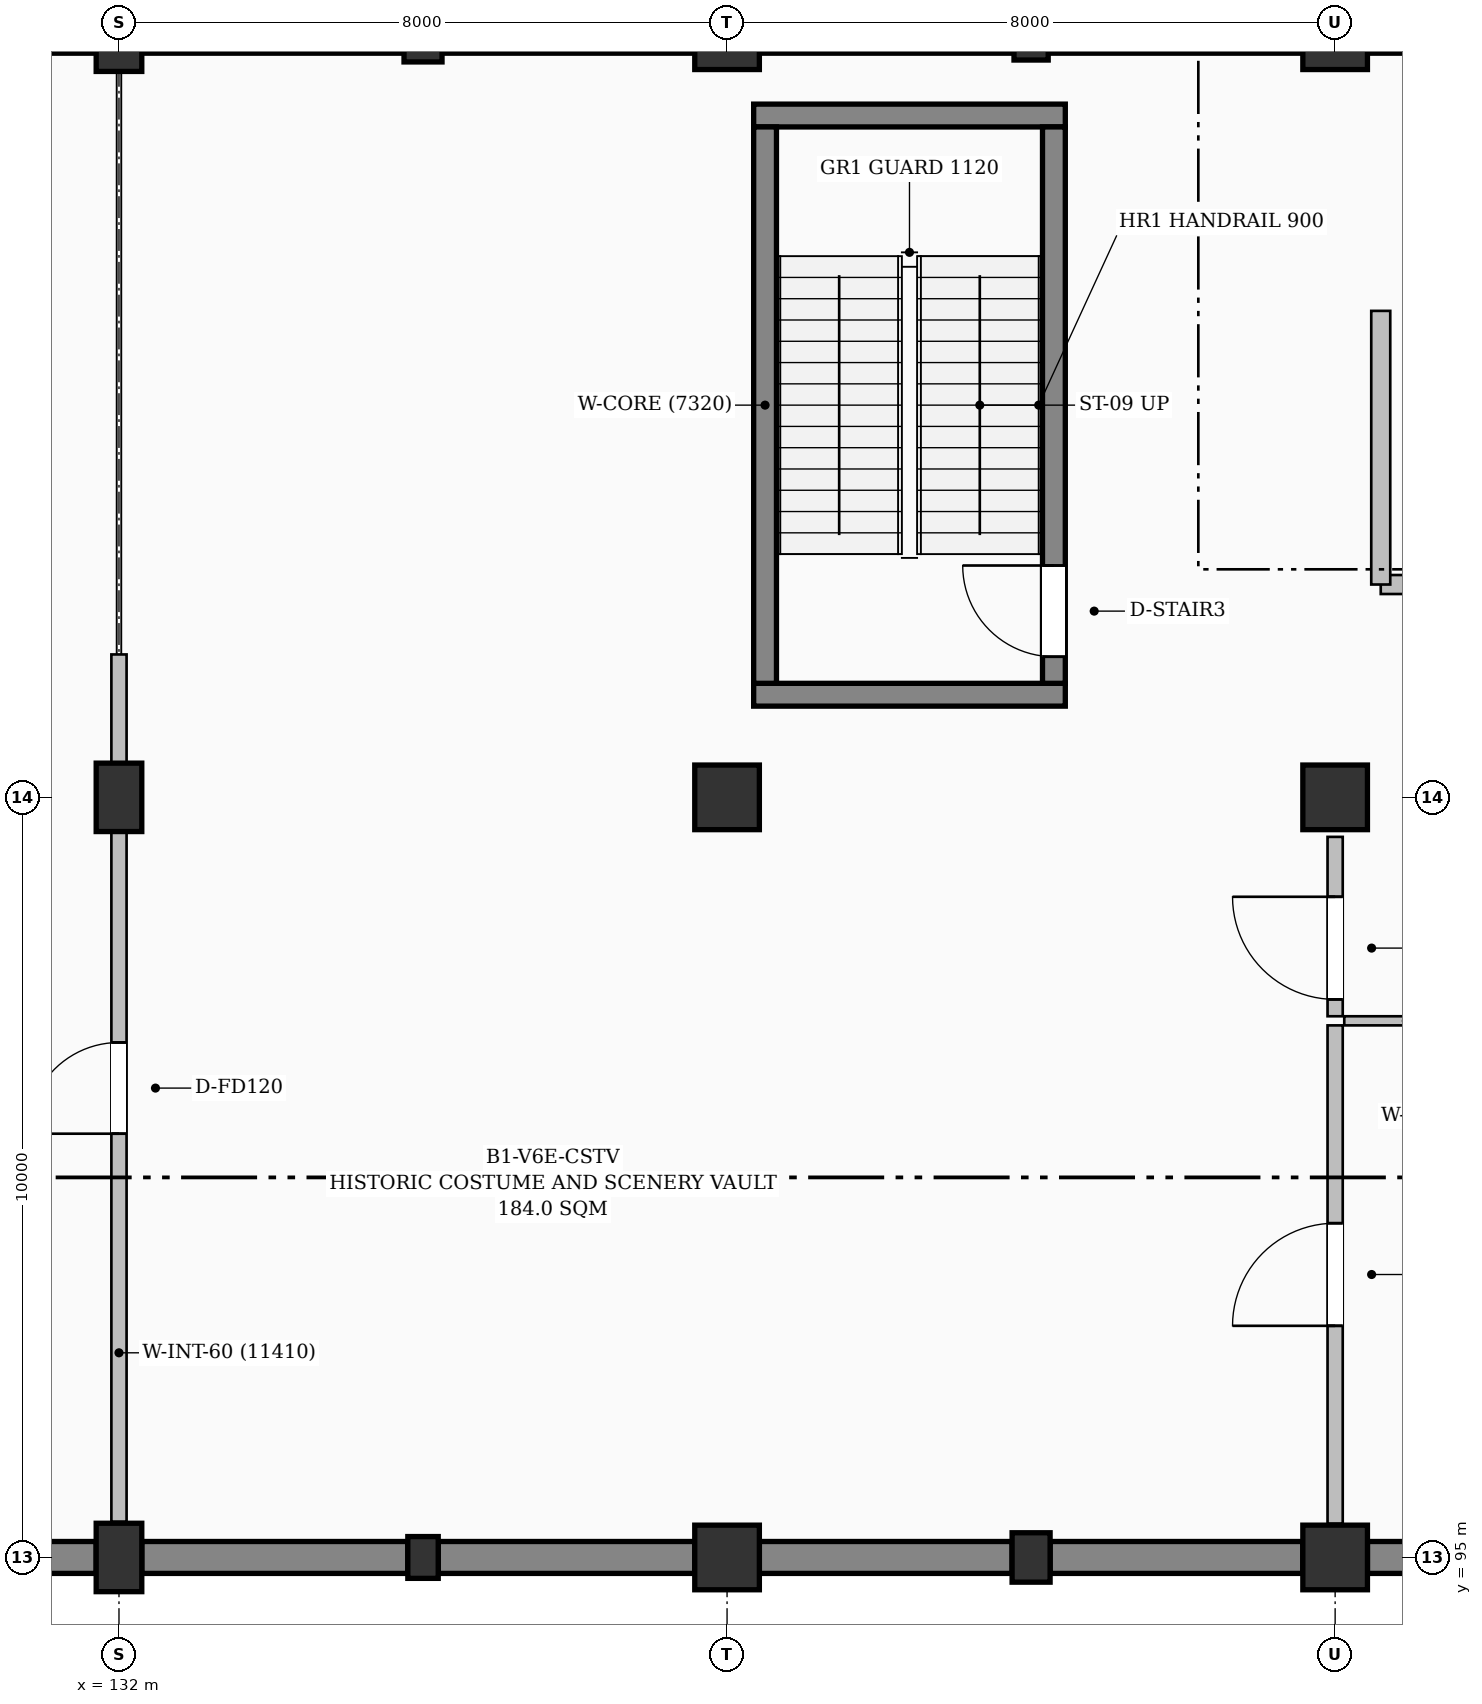
"""IFC4 building model, lengths in metres.
Left out: names, types, materials, properties, quantities, classifications, styles, units other than length and angle.
Written with IfcOpenShell. Run it as: python <this file> out.ifc"""

import sys

from ifc_helpers import new_model, si_unit, direction, frame, frame_2d, origin, origin_2d, place, context, subcontext, project, spatial, rectangle, extrude, element, fill, save


model = new_model("IFC4")
c1 = context("Model", 3, precision=1e-05, world=origin(), true_north=direction((0.0, 1.0)))
c2 = subcontext(c1, "Body", "Model", "MODEL_VIEW")
j1 = project(units=[si_unit("LENGTHUNIT", "METRE"), si_unit("PLANEANGLEUNIT", "RADIAN")], contexts=[c1])
p1 = place(None, origin())
s1 = spatial("IfcSite", under=j1, at=p1, CompositionType="ELEMENT")
p2 = place(p1, origin())
s2 = spatial("IfcBuilding", under=s1, at=p2, CompositionType="ELEMENT")
p3 = place(p2, frame((0.0, 0.0, -4.8)))
s3 = spatial("IfcBuildingStorey", under=s2, at=p3, CompositionType="ELEMENT", Elevation=-4.8)
for number, where, z_axis, x_axis in (
    (1, (132.0, 95.0, -0.38), (0.0, 0.0, 1.0), (1.0, 0.0, 0.0)),
    (2, (132.0, 105.0, -0.38), (0.0, 0.0, 1.0), (1.0, 0.0, 0.0)),
    (3, (132.0, 115.0, -0.38), (0.0, 0.0, 1.0), (1.0, 0.0, 0.0)),
):
    element("IfcColumn", number, at=place(p3, frame(where, z_axis=z_axis, x_axis=x_axis)), inside=s3, PredefinedType="COLUMN", context=c2, shape_type="SweptSolid", body=[
        extrude(rectangle(XDim=0.6, YDim=0.9, at=origin_2d()), origin(), (0.0, 0.0, 1.0), 5.18),
    ])
p4 = place(p3, frame((136.0, 95.0, -0.38), z_axis=(0.0, 0.0, 1.0), x_axis=(1.0, 0.0, 0.0)))
e4 = element("IfcColumn", 4, at=p4, inside=s3, PredefinedType="PILASTER", context=c2, shape_type="SweptSolid", body=[
    extrude(rectangle(XDim=0.4, YDim=0.55, at=origin_2d()), origin(), (0.0, 0.0, 1.0), 5.18),
])
p5 = place(p3, frame((136.0, 115.0, -0.38), z_axis=(0.0, 0.0, 1.0), x_axis=(1.0, 0.0, 0.0)))
e5 = element("IfcColumn", 5, at=p5, inside=s3, PredefinedType="PILASTER", context=c2, shape_type="SweptSolid", body=[
    extrude(rectangle(XDim=0.5, YDim=0.65, at=origin_2d()), origin(), (0.0, 0.0, 1.0), 5.18),
])
for number, where, z_axis, x_axis in (
    (6, (140.0, 95.0, -0.38), (0.0, 0.0, 1.0), (1.0, 0.0, 0.0)),
    (7, (140.0, 105.0, -0.38), (0.0, 0.0, 1.0), (1.0, 0.0, 0.0)),
    (8, (140.0, 115.0, -0.38), (0.0, 0.0, 1.0), (1.0, 0.0, 0.0)),
):
    element("IfcColumn", number, at=place(p3, frame(where, z_axis=z_axis, x_axis=x_axis)), inside=s3, PredefinedType="COLUMN", context=c2, shape_type="SweptSolid", body=[
        extrude(rectangle(XDim=0.85, YDim=0.85, at=origin_2d()), origin(), (0.0, 0.0, 1.0), 5.18),
    ])
p6 = place(p3, frame((144.0, 95.0, -0.38), z_axis=(0.0, 0.0, 1.0), x_axis=(1.0, 0.0, 0.0)))
e9 = element("IfcColumn", 9, at=p6, inside=s3, PredefinedType="PILASTER", context=c2, shape_type="SweptSolid", body=[
    extrude(rectangle(XDim=0.5, YDim=0.65, at=origin_2d()), origin(), (0.0, 0.0, 1.0), 5.18),
])
p7 = place(p3, frame((144.0, 115.0, -0.38), z_axis=(0.0, 0.0, 1.0), x_axis=(1.0, 0.0, 0.0)))
e10 = element("IfcColumn", 10, at=p7, inside=s3, PredefinedType="PILASTER", context=c2, shape_type="SweptSolid", body=[
    extrude(rectangle(XDim=0.45, YDim=0.6, at=origin_2d()), origin(), (0.0, 0.0, 1.0), 5.18),
])
for number, where, z_axis, x_axis in (
    (11, (148.0, 95.0, -0.38), (0.0, 0.0, 1.0), (1.0, 0.0, 0.0)),
    (12, (148.0, 105.0, -0.38), (0.0, 0.0, 1.0), (1.0, 0.0, 0.0)),
    (13, (148.0, 115.0, -0.38), (0.0, 0.0, 1.0), (1.0, 0.0, 0.0)),
):
    element("IfcColumn", number, at=place(p3, frame(where, z_axis=z_axis, x_axis=x_axis)), inside=s3, PredefinedType="COLUMN", context=c2, shape_type="SweptSolid", body=[
        extrude(rectangle(XDim=0.85, YDim=0.85, at=origin_2d()), origin(), (0.0, 0.0, 1.0), 5.18),
    ])
p8 = place(p3, frame((128.2, 115.0, 0.0), z_axis=(0.0, 0.0, 1.0), x_axis=(1.0, 0.0, 0.0)))
e14 = element("IfcWall", 14, at=p8, inside=s3, PredefinedType="USERDEFINED", context=c2, shape_type="SweptSolid", body=[
    extrude(rectangle(XDim=3.5, YDim=0.42, at=frame_2d((1.75, 0.0))), origin(), (0.0, 0.0, 1.0), 3.85),
])
p9 = place(p3, frame((132.3, 115.0, 0.0), z_axis=(0.0, 0.0, 1.0), x_axis=(1.0, 0.0, 0.0)))
e15 = element("IfcWall", 15, at=p9, inside=s3, PredefinedType="USERDEFINED", context=c2, shape_type="SweptSolid", body=[
    extrude(rectangle(XDim=3.45, YDim=0.42, at=frame_2d((1.725, 0.0))), origin(), (0.0, 0.0, 1.0), 3.85),
])
p10 = place(p3, frame((136.25, 115.0, 0.0), z_axis=(0.0, 0.0, 1.0), x_axis=(1.0, 0.0, 0.0)))
e16 = element("IfcWall", 16, at=p10, inside=s3, PredefinedType="USERDEFINED", context=c2, shape_type="SweptSolid", body=[
    extrude(rectangle(XDim=3.325, YDim=0.42, at=frame_2d((1.663, 0.0))), origin(), (0.0, 0.0, 1.0), 3.85),
])
for number, where, z_axis, x_axis in (
    (17, (140.425, 115.0, 0.0), (0.0, 0.0, 1.0), (1.0, 0.0, 0.0)),
    (18, (144.225, 115.0, 0.0), (0.0, 0.0, 1.0), (1.0, 0.0, 0.0)),
):
    element("IfcWall", number, at=place(p3, frame(where, z_axis=z_axis, x_axis=x_axis)), inside=s3, PredefinedType="USERDEFINED", context=c2, shape_type="SweptSolid", body=[
        extrude(rectangle(XDim=3.35, YDim=0.42, at=frame_2d((1.675, 0.0))), origin(), (0.0, 0.0, 1.0), 3.85),
    ])
p11 = place(p3, frame((148.425, 115.0, 0.0), z_axis=(0.0, 0.0, 1.0), x_axis=(1.0, 0.0, 0.0)))
e19 = element("IfcWall", 19, at=p11, inside=s3, PredefinedType="USERDEFINED", context=c2, shape_type="SweptSolid", body=[
    extrude(rectangle(XDim=3.375, YDim=0.42, at=frame_2d((1.688, 0.0))), origin(), (0.0, 0.0, 1.0), 3.85),
])
p12 = place(p3, frame((151.775, 95.0, 0.0), z_axis=(0.0, 0.0, 1.0), x_axis=(-1.0, 0.0, 0.0)))
e20 = element("IfcWall", 20, at=p12, inside=s3, PredefinedType="USERDEFINED", context=c2, shape_type="SweptSolid", body=[
    extrude(rectangle(XDim=3.35, YDim=0.42, at=frame_2d((1.675, 0.0))), origin(), (0.0, 0.0, 1.0), 3.85),
])
for number, where, z_axis, x_axis in (
    (21, (147.575, 95.0, 0.0), (0.0, 0.0, 1.0), (-1.0, 0.0, 0.0)),
    (22, (143.75, 95.0, 0.0), (0.0, 0.0, 1.0), (-1.0, 0.0, 0.0)),
):
    element("IfcWall", number, at=place(p3, frame(where, z_axis=z_axis, x_axis=x_axis)), inside=s3, PredefinedType="USERDEFINED", context=c2, shape_type="SweptSolid", body=[
        extrude(rectangle(XDim=3.325, YDim=0.42, at=frame_2d((1.663, 0.0))), origin(), (0.0, 0.0, 1.0), 3.85),
    ])
p13 = place(p3, frame((139.575, 95.0, 0.0), z_axis=(0.0, 0.0, 1.0), x_axis=(-1.0, 0.0, 0.0)))
e23 = element("IfcWall", 23, at=p13, inside=s3, PredefinedType="USERDEFINED", context=c2, shape_type="SweptSolid", body=[
    extrude(rectangle(XDim=3.375, YDim=0.42, at=frame_2d((1.688, 0.0))), origin(), (0.0, 0.0, 1.0), 3.85),
])
p14 = place(p3, frame((135.8, 95.0, 0.0), z_axis=(0.0, 0.0, 1.0), x_axis=(-1.0, 0.0, 0.0)))
e24 = element("IfcWall", 24, at=p14, inside=s3, PredefinedType="USERDEFINED", context=c2, shape_type="SweptSolid", body=[
    extrude(rectangle(XDim=3.5, YDim=0.42, at=frame_2d((1.75, 0.0))), origin(), (0.0, 0.0, 1.0), 3.85),
])
p15 = place(p3, frame((131.7, 95.0, 0.0), z_axis=(0.0, 0.0, 1.0), x_axis=(-1.0, 0.0, 0.0)))
e25 = element("IfcWall", 25, at=p15, inside=s3, PredefinedType="USERDEFINED", context=c2, shape_type="SweptSolid", body=[
    extrude(rectangle(XDim=3.475, YDim=0.42, at=frame_2d((1.737, 0.0))), origin(), (0.0, 0.0, 1.0), 3.85),
])
for number, where, z_axis, x_axis in (
    (26, (140.35, 106.35, -0.38), (0.0, 0.0, 1.0), (1.0, 0.0, 0.0)),
    (27, (144.45, 113.97, -0.38), (0.0, 0.0, 1.0), (-1.0, 0.0, 0.0)),
):
    element("IfcWall", number, at=place(p3, frame(where, z_axis=z_axis, x_axis=x_axis)), inside=s3, PredefinedType="SHEAR", context=c2, shape_type="SweptSolid", body=[
        extrude(rectangle(XDim=4.1, YDim=0.3, at=frame_2d((2.05, 0.0))), origin(), (0.0, 0.0, 1.0), 4.88),
    ])
p16 = place(p3, frame((140.5, 106.5, -0.38), z_axis=(0.0, 0.0, 1.0), x_axis=(0.0, 1.0, 0.0)))
e28 = element("IfcWall", 28, at=p16, inside=s3, PredefinedType="SHEAR", context=c2, shape_type="SweptSolid", body=[
    extrude(rectangle(XDim=7.32, YDim=0.3, at=frame_2d((3.66, 0.0))), origin(), (0.0, 0.0, 1.0), 4.88),
])
p17 = place(p3, frame((144.3, 106.5, -0.38), z_axis=(0.0, 0.0, 1.0), x_axis=(0.0, 1.0, 0.0)))
e29 = element("IfcWall", 29, at=p17, inside=s3, PredefinedType="SHEAR", context=c2, shape_type="SweptSolid", body=[
    extrude(rectangle(XDim=7.32, YDim=0.3, at=frame_2d((3.66, 0.0))), origin(), (0.0, 0.0, 1.0), 4.88),
])
p18 = place(p17, frame((0.35, 0.0, 0.38)))
e30 = element("IfcOpeningElement", 30, at=p18, cuts=e29, PredefinedType="OPENING", context=c2, shape_type="SweptSolid", body=[
    extrude(rectangle(XDim=1.2, YDim=2.15, at=frame_2d((0.6, 1.075))), frame((0.0, 0.16, 0.0), z_axis=(0.0, -1.0, 0.0), x_axis=(1.0, 0.0, 0.0)), (0.0, 0.0, 1.0), 0.32),
])
p19 = place(p3, frame((152.2, 107.8, 0.0), z_axis=(0.0, 0.0, 1.0), x_axis=(-1.0, 0.0, 0.0)))
e31 = element("IfcWall", 31, at=p19, inside=s3, PredefinedType="SOLIDWALL", context=c2, shape_type="SweptSolid", body=[
    extrude(rectangle(XDim=3.6, YDim=0.25, at=frame_2d((1.8, 0.0))), origin(), (0.0, 0.0, 1.0), 4.5),
])
p20 = place(p19, frame((1.225, 0.0, 0.0)))
e32 = element("IfcOpeningElement", 32, at=p20, cuts=e31, PredefinedType="OPENING", context=c2, shape_type="SweptSolid", body=[
    extrude(rectangle(XDim=1.15, YDim=2.15, at=frame_2d((0.575, 1.075))), frame((0.0, 0.135, 0.0), z_axis=(0.0, -1.0, 0.0), x_axis=(1.0, 0.0, 0.0)), (0.0, 0.0, 1.0), 0.27),
])
p21 = place(p3, frame((148.6, 107.8, 0.0), z_axis=(0.0, 0.0, 1.0), x_axis=(0.0, 1.0, 0.0)))
e33 = element("IfcWall", 33, at=p21, inside=s3, PredefinedType="SOLIDWALL", context=c2, shape_type="SweptSolid", body=[
    extrude(rectangle(XDim=3.6, YDim=0.25, at=frame_2d((1.8, 0.0))), origin(), (0.0, 0.0, 1.0), 4.5),
])
p22 = place(p3, frame((132.0, 95.47, 0.0), z_axis=(0.0, 0.0, 1.0), x_axis=(0.0, 1.0, 0.0)))
e34 = element("IfcWall", 34, at=p22, inside=s3, PredefinedType="PARTITIONING", context=c2, shape_type="SweptSolid", body=[
    extrude(rectangle(XDim=11.41, YDim=0.2, at=frame_2d((5.705, 0.0))), origin(), (0.0, 0.0, 1.0), 3.535),
])
p23 = place(p22, frame((5.105, 0.0, 0.0)))
e35 = element("IfcOpeningElement", 35, at=p23, cuts=e34, PredefinedType="OPENING", context=c2, shape_type="SweptSolid", body=[
    extrude(rectangle(XDim=1.2, YDim=2.2, at=frame_2d((0.6, 1.1))), frame((0.0, 0.11, 0.0), z_axis=(0.0, -1.0, 0.0), x_axis=(1.0, 0.0, 0.0)), (0.0, 0.0, 1.0), 0.22),
])
p24 = place(p3, frame((148.0, 102.12, 0.0), z_axis=(0.0, 0.0, 1.0), x_axis=(0.0, 1.0, 0.0)))
e36 = element("IfcWall", 36, at=p24, inside=s3, PredefinedType="PARTITIONING", context=c2, shape_type="SweptSolid", body=[
    extrude(rectangle(XDim=2.36, YDim=0.2, at=frame_2d((1.18, 0.0))), origin(), (0.0, 0.0, 1.0), 4.035),
])
p25 = place(p24, frame((0.222, 0.0, 0.0)))
e37 = element("IfcOpeningElement", 37, at=p25, cuts=e36, PredefinedType="OPENING", context=c2, shape_type="SweptSolid", body=[
    extrude(rectangle(XDim=1.35, YDim=2.2, at=frame_2d((0.675, 1.1))), frame((0.0, 0.11, 0.0), z_axis=(0.0, -1.0, 0.0), x_axis=(1.0, 0.0, 0.0)), (0.0, 0.0, 1.0), 0.22),
])
p26 = place(p3, frame((148.0, 95.445, 0.0), z_axis=(0.0, 0.0, 1.0), x_axis=(0.0, 1.0, 0.0)))
e38 = element("IfcWall", 38, at=p26, inside=s3, PredefinedType="PARTITIONING", context=c2, shape_type="SweptSolid", body=[
    extrude(rectangle(XDim=6.555, YDim=0.2, at=frame_2d((3.277, 0.0))), origin(), (0.0, 0.0, 1.0), 4.035),
])
p27 = place(p26, frame((2.603, 0.0, 0.0)))
e39 = element("IfcOpeningElement", 39, at=p27, cuts=e38, PredefinedType="OPENING", context=c2, shape_type="SweptSolid", body=[
    extrude(rectangle(XDim=1.35, YDim=2.2, at=frame_2d((0.675, 1.1))), frame((0.0, 0.11, 0.0), z_axis=(0.0, -1.0, 0.0), x_axis=(1.0, 0.0, 0.0)), (0.0, 0.0, 1.0), 0.22),
])
p28 = place(p3, frame((148.12, 102.06, 0.0), z_axis=(0.0, 0.0, 1.0), x_axis=(1.0, 0.0, 0.0)))
e40 = element("IfcWall", 40, at=p28, inside=s3, PredefinedType="PARTITIONING", context=c2, shape_type="SweptSolid", body=[
    extrude(rectangle(XDim=5.26, YDim=0.12, at=frame_2d((2.63, 0.0))), origin(), (0.0, 0.0, 1.0), 4.125),
])
p29 = place(p28, frame((2.155, 0.0, 0.0)))
e41 = element("IfcOpeningElement", 41, at=p29, cuts=e40, PredefinedType="OPENING", context=c2, shape_type="SweptSolid", body=[
    extrude(rectangle(XDim=0.95, YDim=2.1, at=frame_2d((0.475, 1.05))), frame((0.0, 0.07, 0.0), z_axis=(0.0, -1.0, 0.0), x_axis=(1.0, 0.0, 0.0)), (0.0, 0.0, 1.0), 0.14),
])
p30 = place(p18, origin())
e42 = element("IfcDoor", 42, at=p30, inside=s3, OperationType="SINGLE_SWING_RIGHT", PredefinedType="DOOR", context=c2, shape_type="SweptSolid", body=[
    extrude(rectangle(XDim=1.2, YDim=2.15, at=frame_2d((0.6, 1.075))), frame((0.0, 0.025, 0.0), z_axis=(0.0, -1.0, 0.0), x_axis=(1.0, 0.0, 0.0)), (0.0, 0.0, 1.0), 0.05),
])
fill(e30, e42)
p31 = place(p23, origin())
e43 = element("IfcDoor", 43, at=p31, inside=s3, OperationType="SINGLE_SWING_LEFT", PredefinedType="DOOR", context=c2, shape_type="SweptSolid", body=[
    extrude(rectangle(XDim=1.2, YDim=2.2, at=frame_2d((0.6, 1.1))), frame((0.0, 0.025, 0.0), z_axis=(0.0, -1.0, 0.0), x_axis=(1.0, 0.0, 0.0)), (0.0, 0.0, 1.0), 0.05),
])
fill(e35, e43)
p32 = place(p25, origin())
e44 = element("IfcDoor", 44, at=p32, inside=s3, OperationType="SINGLE_SWING_RIGHT", PredefinedType="DOOR", context=c2, shape_type="SweptSolid", body=[
    extrude(rectangle(XDim=1.35, YDim=2.2, at=frame_2d((0.675, 1.1))), frame((0.0, 0.025, 0.0), z_axis=(0.0, -1.0, 0.0), x_axis=(1.0, 0.0, 0.0)), (0.0, 0.0, 1.0), 0.05),
])
fill(e37, e44)
p33 = place(p27, origin())
e45 = element("IfcDoor", 45, at=p33, inside=s3, OperationType="SINGLE_SWING_LEFT", PredefinedType="DOOR", context=c2, shape_type="SweptSolid", body=[
    extrude(rectangle(XDim=1.35, YDim=2.2, at=frame_2d((0.675, 1.1))), frame((0.0, 0.025, 0.0), z_axis=(0.0, -1.0, 0.0), x_axis=(1.0, 0.0, 0.0)), (0.0, 0.0, 1.0), 0.05),
])
fill(e39, e45)
save(model, sys.argv[1])
